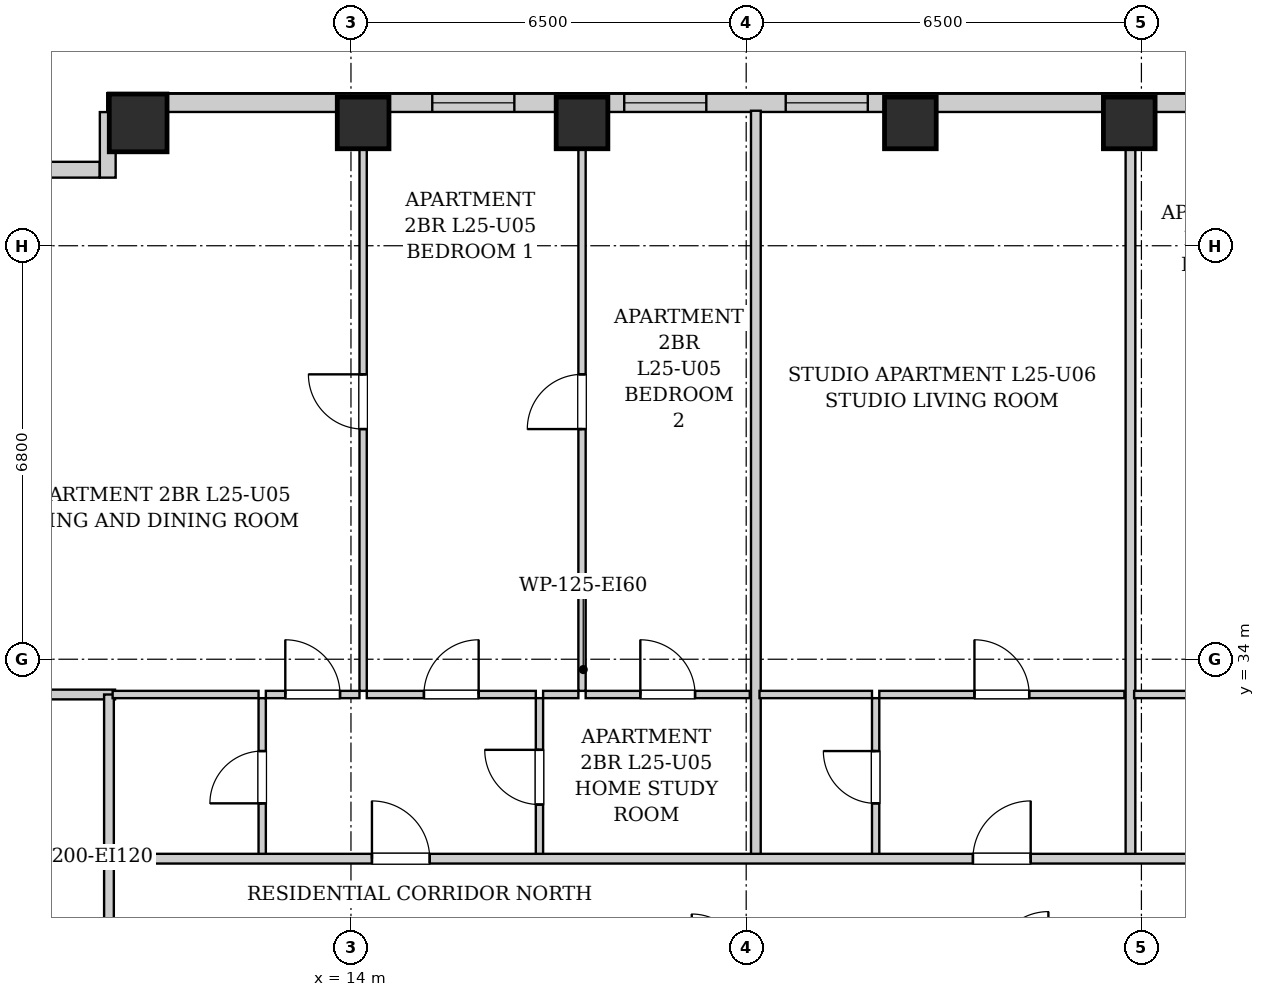
"""IFC4 building model, lengths in metres.
Left out: names, types, materials, properties, quantities, classifications, styles, units other than length and angle.
Written with IfcOpenShell. Run it as: python <this file> out.ifc"""

import sys

from ifc_helpers import new_model, si_unit, direction, frame, frame_2d, origin, origin_2d, place, context, subcontext, project, spatial, rectangle, extrude, element, fill, save


model = new_model("IFC4")
c1 = context("Model", 3, precision=1e-05, world=origin(), true_north=direction((0.0, 1.0)))
c2 = subcontext(c1, "Body", "Model", "MODEL_VIEW")
j1 = project(units=[si_unit("LENGTHUNIT", "METRE"), si_unit("PLANEANGLEUNIT", "RADIAN")], contexts=[c1])
p1 = place(None, origin())
s1 = spatial("IfcSite", under=j1, at=p1, CompositionType="ELEMENT")
p2 = place(p1, origin())
s2 = spatial("IfcBuilding", under=s1, at=p2, CompositionType="ELEMENT")
p3 = place(p2, frame((0.0, 0.0, 91.1)))
s3 = spatial("IfcBuildingStorey", under=s2, at=p3, CompositionType="ELEMENT", Elevation=91.1)
p4 = place(p3, frame((10.5, 42.82, 0.0), z_axis=(0.0, 0.0, 1.0), x_axis=(1.0, 0.0, 0.0)))
e1 = element("IfcColumn", 1, at=p4, inside=s3, PredefinedType="COLUMN", context=c2, shape_type="SweptSolid", body=[
    extrude(rectangle(XDim=0.95, YDim=0.95, at=origin_2d()), origin(), (0.0, 0.0, 1.0), 3.2),
])
for number, where, z_axis, x_axis in (
    (2, (14.2, 42.82, 0.0), (0.0, 0.0, 1.0), (1.0, 0.0, 0.0)),
    (3, (17.8, 42.82, 0.0), (0.0, 0.0, 1.0), (1.0, 0.0, 0.0)),
    (4, (23.2, 42.82, 0.0), (0.0, 0.0, 1.0), (1.0, 0.0, 0.0)),
    (5, (26.8, 42.82, 0.0), (0.0, 0.0, 1.0), (1.0, 0.0, 0.0)),
):
    element("IfcColumn", number, at=place(p3, frame(where, z_axis=z_axis, x_axis=x_axis)), inside=s3, PredefinedType="COLUMN", context=c2, shape_type="SweptSolid", body=[
        extrude(rectangle(XDim=0.85, YDim=0.85, at=origin_2d()), origin(), (0.0, 0.0, 1.0), 3.2),
    ])
p5 = place(p3, frame((10.0, 43.15, 0.0), z_axis=(0.0, 0.0, 1.0), x_axis=(1.0, 0.0, 0.0)))
e6 = element("IfcWall", 6, at=p5, inside=s3, PredefinedType="SOLIDWALL", context=c2, shape_type="SweptSolid", body=[
    extrude(rectangle(XDim=23.9, YDim=0.3, at=frame_2d((11.95, 0.0))), origin(), (0.0, 0.0, 1.0), 2.94),
])
p6 = place(p5, frame((5.337, 0.0, 0.55)))
e7 = element("IfcOpeningElement", 7, at=p6, cuts=e6, PredefinedType="OPENING", context=c2, shape_type="SweptSolid", body=[
    extrude(rectangle(XDim=1.35, YDim=1.2, at=frame_2d((0.675, 0.6))), frame((0.0, 0.16, 0.0), z_axis=(0.0, -1.0, 0.0), x_axis=(1.0, 0.0, 0.0)), (0.0, 0.0, 1.0), 0.32),
])
p7 = place(p5, frame((8.494, 0.0, 0.55)))
e8 = element("IfcOpeningElement", 8, at=p7, cuts=e6, PredefinedType="OPENING", context=c2, shape_type="SweptSolid", body=[
    extrude(rectangle(XDim=1.35, YDim=1.2, at=frame_2d((0.675, 0.6))), frame((0.0, 0.16, 0.0), z_axis=(0.0, -1.0, 0.0), x_axis=(1.0, 0.0, 0.0)), (0.0, 0.0, 1.0), 0.32),
])
p8 = place(p5, frame((11.15, 0.0, 0.55)))
e9 = element("IfcOpeningElement", 9, at=p8, cuts=e6, PredefinedType="OPENING", context=c2, shape_type="SweptSolid", body=[
    extrude(rectangle(XDim=1.35, YDim=1.2, at=frame_2d((0.675, 0.6))), frame((0.0, 0.16, 0.0), z_axis=(0.0, -1.0, 0.0), x_axis=(1.0, 0.0, 0.0)), (0.0, 0.0, 1.0), 0.32),
])
p9 = place(p5, frame((17.738, 0.0, 0.55)))
e10 = element("IfcOpeningElement", 10, at=p9, cuts=e6, PredefinedType="OPENING", context=c2, shape_type="SweptSolid", body=[
    extrude(rectangle(XDim=1.35, YDim=1.2, at=frame_2d((0.675, 0.6))), frame((0.0, 0.16, 0.0), z_axis=(0.0, -1.0, 0.0), x_axis=(1.0, 0.0, 0.0)), (0.0, 0.0, 1.0), 0.32),
])
p10 = place(p5, frame((20.97, 0.0, 0.55)))
e11 = element("IfcOpeningElement", 11, at=p10, cuts=e6, PredefinedType="OPENING", context=c2, shape_type="SweptSolid", body=[
    extrude(rectangle(XDim=1.35, YDim=1.2, at=frame_2d((0.675, 0.6))), frame((0.0, 0.16, 0.0), z_axis=(0.0, -1.0, 0.0), x_axis=(1.0, 0.0, 0.0)), (0.0, 0.0, 1.0), 0.32),
])
p11 = place(p3, frame((8.882, 42.05, 0.0), z_axis=(0.0, 0.0, 1.0), x_axis=(1.0, 0.0, 0.0)))
e12 = element("IfcWall", 12, at=p11, inside=s3, PredefinedType="SOLIDWALL", context=c2, shape_type="SweptSolid", body=[
    extrude(rectangle(XDim=0.986, YDim=0.26, at=frame_2d((0.493, 0.0))), origin(), (0.0, 0.0, 1.0), 2.94),
])
p12 = place(p3, frame((10.0, 41.92, 0.0), z_axis=(0.0, 0.0, 1.0), x_axis=(0.0, 1.0, 0.0)))
e13 = element("IfcWall", 13, at=p12, inside=s3, PredefinedType="SOLIDWALL", context=c2, shape_type="SweptSolid", body=[
    extrude(rectangle(XDim=1.078, YDim=0.26, at=frame_2d((0.539, 0.0))), origin(), (0.0, 0.0, 1.0), 2.94),
])
p13 = place(p3, frame((10.02, 28.98, 0.0), z_axis=(0.0, 0.0, 1.0), x_axis=(0.0, 1.0, 0.0)))
e14 = element("IfcWall", 14, at=p13, inside=s3, PredefinedType="PARTITIONING", context=c2, shape_type="SweptSolid", body=[
    extrude(rectangle(XDim=1.74, YDim=0.16, at=frame_2d((0.87, 0.0))), origin(), (0.0, 0.0, 1.0), 2.94),
])
p14 = place(p3, frame((7.78, 33.42, 0.0), z_axis=(0.0, 0.0, 1.0), x_axis=(1.0, 0.0, 0.0)))
e15 = element("IfcWall", 15, at=p14, inside=s3, PredefinedType="PARTITIONING", context=c2, shape_type="SweptSolid", body=[
    extrude(rectangle(XDim=2.34, YDim=0.16, at=frame_2d((1.17, 0.0))), origin(), (0.0, 0.0, 1.0), 2.94),
])
p15 = place(p3, frame((10.02, 30.76, 0.0), z_axis=(0.0, 0.0, 1.0), x_axis=(0.0, 1.0, 0.0)))
e16 = element("IfcWall", 16, at=p15, inside=s3, PredefinedType="PARTITIONING", context=c2, shape_type="SweptSolid", body=[
    extrude(rectangle(XDim=2.66, YDim=0.16, at=frame_2d((1.33, 0.0))), origin(), (0.0, 0.0, 1.0), 2.94),
])
p16 = place(p3, frame((12.54, 30.76, 0.0), z_axis=(0.0, 0.0, 1.0), x_axis=(0.0, 1.0, 0.0)))
e17 = element("IfcWall", 17, at=p16, inside=s3, PredefinedType="PARTITIONING", context=c2, shape_type="SweptSolid", body=[
    extrude(rectangle(XDim=2.6, YDim=0.12, at=frame_2d((1.3, 0.0))), origin(), (0.0, 0.0, 1.0), 2.94),
])
p17 = place(p16, frame((0.87, 0.0, 0.0)))
e18 = element("IfcOpeningElement", 18, at=p17, cuts=e17, PredefinedType="OPENING", context=c2, shape_type="SweptSolid", body=[
    extrude(rectangle(XDim=0.86, YDim=2.05, at=frame_2d((0.43, 1.025))), frame((0.0, 0.07, 0.0), z_axis=(0.0, -1.0, 0.0), x_axis=(1.0, 0.0, 0.0)), (0.0, 0.0, 1.0), 0.14),
])
p18 = place(p3, frame((10.08, 33.42, 0.0), z_axis=(0.0, 0.0, 1.0), x_axis=(1.0, 0.0, 0.0)))
e19 = element("IfcWall", 19, at=p18, inside=s3, PredefinedType="PARTITIONING", context=c2, shape_type="SweptSolid", body=[
    extrude(rectangle(XDim=2.4, YDim=0.12, at=frame_2d((1.2, 0.0))), origin(), (0.0, 0.0, 1.0), 2.94),
])
p19 = place(p3, frame((17.1, 30.76, 0.0), z_axis=(0.0, 0.0, 1.0), x_axis=(0.0, 1.0, 0.0)))
e20 = element("IfcWall", 20, at=p19, inside=s3, PredefinedType="PARTITIONING", context=c2, shape_type="SweptSolid", body=[
    extrude(rectangle(XDim=2.6, YDim=0.12, at=frame_2d((1.3, 0.0))), origin(), (0.0, 0.0, 1.0), 2.94),
])
p20 = place(p19, frame((0.85, 0.0, 0.0)))
e21 = element("IfcOpeningElement", 21, at=p20, cuts=e20, PredefinedType="OPENING", context=c2, shape_type="SweptSolid", body=[
    extrude(rectangle(XDim=0.9, YDim=2.05, at=frame_2d((0.45, 1.025))), frame((0.0, 0.07, 0.0), z_axis=(0.0, -1.0, 0.0), x_axis=(1.0, 0.0, 0.0)), (0.0, 0.0, 1.0), 0.14),
])
p21 = place(p3, frame((12.6, 33.42, 0.0), z_axis=(0.0, 0.0, 1.0), x_axis=(1.0, 0.0, 0.0)))
e22 = element("IfcWall", 22, at=p21, inside=s3, PredefinedType="PARTITIONING", context=c2, shape_type="SweptSolid", body=[
    extrude(rectangle(XDim=1.54, YDim=0.12, at=frame_2d((0.77, 0.0))), origin(), (0.0, 0.0, 1.0), 2.94),
])
p22 = place(p21, frame((0.32, 0.0, 0.0)))
e23 = element("IfcOpeningElement", 23, at=p22, cuts=e22, PredefinedType="OPENING", context=c2, shape_type="SweptSolid", body=[
    extrude(rectangle(XDim=0.9, YDim=2.05, at=frame_2d((0.45, 1.025))), frame((0.0, 0.07, 0.0), z_axis=(0.0, -1.0, 0.0), x_axis=(1.0, 0.0, 0.0)), (0.0, 0.0, 1.0), 0.14),
])
p23 = place(p3, frame((14.26, 33.42, 0.0), z_axis=(0.0, 0.0, 1.0), x_axis=(1.0, 0.0, 0.0)))
e24 = element("IfcWall", 24, at=p23, inside=s3, PredefinedType="PARTITIONING", context=c2, shape_type="SweptSolid", body=[
    extrude(rectangle(XDim=2.78, YDim=0.12, at=frame_2d((1.39, 0.0))), origin(), (0.0, 0.0, 1.0), 2.94),
])
p24 = place(p23, frame((0.94, 0.0, 0.0)))
e25 = element("IfcOpeningElement", 25, at=p24, cuts=e24, PredefinedType="OPENING", context=c2, shape_type="SweptSolid", body=[
    extrude(rectangle(XDim=0.9, YDim=2.05, at=frame_2d((0.45, 1.025))), frame((0.0, 0.07, 0.0), z_axis=(0.0, -1.0, 0.0), x_axis=(1.0, 0.0, 0.0)), (0.0, 0.0, 1.0), 0.14),
])
p25 = place(p3, frame((17.16, 33.42, 0.0), z_axis=(0.0, 0.0, 1.0), x_axis=(1.0, 0.0, 0.0)))
e26 = element("IfcWall", 26, at=p25, inside=s3, PredefinedType="PARTITIONING", context=c2, shape_type="SweptSolid", body=[
    extrude(rectangle(XDim=0.58, YDim=0.12, at=frame_2d((0.29, 0.0))), origin(), (0.0, 0.0, 1.0), 2.94),
])
p26 = place(p3, frame((17.86, 33.42, 0.0), z_axis=(0.0, 0.0, 1.0), x_axis=(1.0, 0.0, 0.0)))
e27 = element("IfcWall", 27, at=p26, inside=s3, PredefinedType="PARTITIONING", context=c2, shape_type="SweptSolid", body=[
    extrude(rectangle(XDim=2.699, YDim=0.12, at=frame_2d((1.35, 0.0))), origin(), (0.0, 0.0, 1.0), 2.94),
])
p27 = place(p26, frame((0.899, 0.0, 0.0)))
e28 = element("IfcOpeningElement", 28, at=p27, cuts=e27, PredefinedType="OPENING", context=c2, shape_type="SweptSolid", body=[
    extrude(rectangle(XDim=0.9, YDim=2.05, at=frame_2d((0.45, 1.025))), frame((0.0, 0.07, 0.0), z_axis=(0.0, -1.0, 0.0), x_axis=(1.0, 0.0, 0.0)), (0.0, 0.0, 1.0), 0.14),
])
p28 = place(p3, frame((14.2, 33.48, 0.0), z_axis=(0.0, 0.0, 1.0), x_axis=(0.0, 1.0, 0.0)))
e29 = element("IfcWall", 29, at=p28, inside=s3, PredefinedType="PARTITIONING", context=c2, shape_type="SweptSolid", body=[
    extrude(rectangle(XDim=9.54, YDim=0.12, at=frame_2d((4.77, 0.0))), origin(), (0.0, 0.0, 1.0), 2.94),
])
p29 = place(p28, frame((4.305, 0.0, 0.0)))
e30 = element("IfcOpeningElement", 30, at=p29, cuts=e29, PredefinedType="OPENING", context=c2, shape_type="SweptSolid", body=[
    extrude(rectangle(XDim=0.9, YDim=2.05, at=frame_2d((0.45, 1.025))), frame((0.0, 0.07, 0.0), z_axis=(0.0, -1.0, 0.0), x_axis=(1.0, 0.0, 0.0)), (0.0, 0.0, 1.0), 0.14),
])
p30 = place(p3, frame((17.8, 33.48, 0.0), z_axis=(0.0, 0.0, 1.0), x_axis=(0.0, 1.0, 0.0)))
e31 = element("IfcWall", 31, at=p30, inside=s3, PredefinedType="PARTITIONING", context=c2, shape_type="SweptSolid", body=[
    extrude(rectangle(XDim=9.54, YDim=0.12, at=frame_2d((4.77, 0.0))), origin(), (0.0, 0.0, 1.0), 2.309),
])
p31 = place(p30, frame((4.305, 0.0, 0.0)))
e32 = element("IfcOpeningElement", 32, at=p31, cuts=e31, PredefinedType="OPENING", context=c2, shape_type="SweptSolid", body=[
    extrude(rectangle(XDim=0.9, YDim=2.05, at=frame_2d((0.45, 1.025))), frame((0.0, 0.07, 0.0), z_axis=(0.0, -1.0, 0.0), x_axis=(1.0, 0.0, 0.0)), (0.0, 0.0, 1.0), 0.14),
])
p32 = place(p3, frame((20.659, 30.76, 0.0), z_axis=(0.0, 0.0, 1.0), x_axis=(0.0, 1.0, 0.0)))
e33 = element("IfcWall", 33, at=p32, inside=s3, PredefinedType="PARTITIONING", context=c2, shape_type="SweptSolid", body=[
    extrude(rectangle(XDim=12.26, YDim=0.16, at=frame_2d((6.13, 0.0))), origin(), (0.0, 0.0, 1.0), 2.94),
])
p33 = place(p3, frame((22.629, 30.76, 0.0), z_axis=(0.0, 0.0, 1.0), x_axis=(0.0, 1.0, 0.0)))
e34 = element("IfcWall", 34, at=p33, inside=s3, PredefinedType="PARTITIONING", context=c2, shape_type="SweptSolid", body=[
    extrude(rectangle(XDim=2.6, YDim=0.12, at=frame_2d((1.3, 0.0))), origin(), (0.0, 0.0, 1.0), 2.94),
])
p34 = place(p33, frame((0.87, 0.0, 0.0)))
e35 = element("IfcOpeningElement", 35, at=p34, cuts=e34, PredefinedType="OPENING", context=c2, shape_type="SweptSolid", body=[
    extrude(rectangle(XDim=0.86, YDim=2.05, at=frame_2d((0.43, 1.025))), frame((0.0, 0.07, 0.0), z_axis=(0.0, -1.0, 0.0), x_axis=(1.0, 0.0, 0.0)), (0.0, 0.0, 1.0), 0.14),
])
p35 = place(p3, frame((20.719, 33.42, 0.0), z_axis=(0.0, 0.0, 1.0), x_axis=(1.0, 0.0, 0.0)))
e36 = element("IfcWall", 36, at=p35, inside=s3, PredefinedType="PARTITIONING", context=c2, shape_type="SweptSolid", body=[
    extrude(rectangle(XDim=1.85, YDim=0.12, at=frame_2d((0.925, 0.0))), origin(), (0.0, 0.0, 1.0), 2.94),
])
p36 = place(p3, frame((22.689, 33.42, 0.0), z_axis=(0.0, 0.0, 1.0), x_axis=(1.0, 0.0, 0.0)))
e37 = element("IfcWall", 37, at=p36, inside=s3, PredefinedType="PARTITIONING", context=c2, shape_type="SweptSolid", body=[
    extrude(rectangle(XDim=4.031, YDim=0.12, at=frame_2d((2.016, 0.0))), origin(), (0.0, 0.0, 1.0), 2.94),
])
p37 = place(p36, frame((1.565, 0.0, 0.0)))
e38 = element("IfcOpeningElement", 38, at=p37, cuts=e37, PredefinedType="OPENING", context=c2, shape_type="SweptSolid", body=[
    extrude(rectangle(XDim=0.9, YDim=2.05, at=frame_2d((0.45, 1.025))), frame((0.0, 0.07, 0.0), z_axis=(0.0, -1.0, 0.0), x_axis=(1.0, 0.0, 0.0)), (0.0, 0.0, 1.0), 0.14),
])
p38 = place(p3, frame((26.82, 30.76, 0.0), z_axis=(0.0, 0.0, 1.0), x_axis=(0.0, 1.0, 0.0)))
e39 = element("IfcWall", 39, at=p38, inside=s3, PredefinedType="PARTITIONING", context=c2, shape_type="SweptSolid", body=[
    extrude(rectangle(XDim=12.26, YDim=0.16, at=frame_2d((6.13, 0.0))), origin(), (0.0, 0.0, 1.0), 2.94),
])
p39 = place(p3, frame((26.88, 33.42, 0.0), z_axis=(0.0, 0.0, 1.0), x_axis=(1.0, 0.0, 0.0)))
e40 = element("IfcWall", 40, at=p39, inside=s3, PredefinedType="PARTITIONING", context=c2, shape_type="SweptSolid", body=[
    extrude(rectangle(XDim=2.4, YDim=0.12, at=frame_2d((1.2, 0.0))), origin(), (0.0, 0.0, 1.0), 2.94),
])
p40 = place(p3, frame((10.05, 30.72, 0.0), z_axis=(0.0, 0.0, 1.0), x_axis=(1.0, 0.0, 0.0)))
e41 = element("IfcWall", 41, at=p40, inside=s3, PredefinedType="PARTITIONING", context=c2, shape_type="SweptSolid", body=[
    extrude(rectangle(XDim=30.8, YDim=0.16, at=frame_2d((15.4, 0.0))), origin(), (0.0, 0.0, 1.0), 2.94),
])
p41 = place(p40, frame((4.295, 0.0, 0.0)))
e42 = element("IfcOpeningElement", 42, at=p41, cuts=e41, PredefinedType="OPENING", context=c2, shape_type="SweptSolid", body=[
    extrude(rectangle(XDim=0.95, YDim=2.1, at=frame_2d((0.475, 1.05))), frame((0.0, 0.09, 0.0), z_axis=(0.0, -1.0, 0.0), x_axis=(1.0, 0.0, 0.0)), (0.0, 0.0, 1.0), 0.18),
])
p42 = place(p40, frame((14.179, 0.0, 0.0)))
e43 = element("IfcOpeningElement", 43, at=p42, cuts=e41, PredefinedType="OPENING", context=c2, shape_type="SweptSolid", body=[
    extrude(rectangle(XDim=0.95, YDim=2.1, at=frame_2d((0.475, 1.05))), frame((0.0, 0.09, 0.0), z_axis=(0.0, -1.0, 0.0), x_axis=(1.0, 0.0, 0.0)), (0.0, 0.0, 1.0), 0.18),
])
p43 = place(p40, frame((20.965, 0.0, 0.0)))
e44 = element("IfcOpeningElement", 44, at=p43, cuts=e41, PredefinedType="OPENING", context=c2, shape_type="SweptSolid", body=[
    extrude(rectangle(XDim=0.95, YDim=2.1, at=frame_2d((0.475, 1.05))), frame((0.0, 0.09, 0.0), z_axis=(0.0, -1.0, 0.0), x_axis=(1.0, 0.0, 0.0)), (0.0, 0.0, 1.0), 0.18),
])
p44 = place(p17, origin())
e45 = element("IfcDoor", 45, at=p44, inside=s3, OperationType="SINGLE_SWING_LEFT", PredefinedType="DOOR", context=c2, shape_type="SweptSolid", body=[
    extrude(rectangle(XDim=0.86, YDim=2.05, at=frame_2d((0.43, 1.025))), frame((0.0, 0.025, 0.0), z_axis=(0.0, -1.0, 0.0), x_axis=(1.0, 0.0, 0.0)), (0.0, 0.0, 1.0), 0.05),
])
fill(e18, e45)
p45 = place(p20, origin())
e46 = element("IfcDoor", 46, at=p45, inside=s3, OperationType="SINGLE_SWING_RIGHT", PredefinedType="DOOR", context=c2, shape_type="SweptSolid", body=[
    extrude(rectangle(XDim=0.9, YDim=2.05, at=frame_2d((0.45, 1.025))), frame((0.0, 0.025, 0.0), z_axis=(0.0, -1.0, 0.0), x_axis=(1.0, 0.0, 0.0)), (0.0, 0.0, 1.0), 0.05),
])
fill(e21, e46)
p46 = place(p22, origin())
e47 = element("IfcDoor", 47, at=p46, inside=s3, OperationType="SINGLE_SWING_LEFT", PredefinedType="DOOR", context=c2, shape_type="SweptSolid", body=[
    extrude(rectangle(XDim=0.9, YDim=2.05, at=frame_2d((0.45, 1.025))), frame((0.0, 0.025, 0.0), z_axis=(0.0, -1.0, 0.0), x_axis=(1.0, 0.0, 0.0)), (0.0, 0.0, 1.0), 0.05),
])
fill(e23, e47)
p47 = place(p24, origin())
e48 = element("IfcDoor", 48, at=p47, inside=s3, OperationType="SINGLE_SWING_RIGHT", PredefinedType="DOOR", context=c2, shape_type="SweptSolid", body=[
    extrude(rectangle(XDim=0.9, YDim=2.05, at=frame_2d((0.45, 1.025))), frame((0.0, 0.025, 0.0), z_axis=(0.0, -1.0, 0.0), x_axis=(1.0, 0.0, 0.0)), (0.0, 0.0, 1.0), 0.05),
])
fill(e25, e48)
p48 = place(p27, origin())
e49 = element("IfcDoor", 49, at=p48, inside=s3, OperationType="SINGLE_SWING_LEFT", PredefinedType="DOOR", context=c2, shape_type="SweptSolid", body=[
    extrude(rectangle(XDim=0.9, YDim=2.05, at=frame_2d((0.45, 1.025))), frame((0.0, 0.025, 0.0), z_axis=(0.0, -1.0, 0.0), x_axis=(1.0, 0.0, 0.0)), (0.0, 0.0, 1.0), 0.05),
])
fill(e28, e49)
p49 = place(p29, origin())
e50 = element("IfcDoor", 50, at=p49, inside=s3, OperationType="SINGLE_SWING_RIGHT", PredefinedType="DOOR", context=c2, shape_type="SweptSolid", body=[
    extrude(rectangle(XDim=0.9, YDim=2.05, at=frame_2d((0.45, 1.025))), frame((0.0, 0.025, 0.0), z_axis=(0.0, -1.0, 0.0), x_axis=(1.0, 0.0, 0.0)), (0.0, 0.0, 1.0), 0.05),
])
fill(e30, e50)
p50 = place(p31, origin())
e51 = element("IfcDoor", 51, at=p50, inside=s3, OperationType="SINGLE_SWING_LEFT", PredefinedType="DOOR", context=c2, shape_type="SweptSolid", body=[
    extrude(rectangle(XDim=0.9, YDim=2.05, at=frame_2d((0.45, 1.025))), frame((0.0, 0.025, 0.0), z_axis=(0.0, -1.0, 0.0), x_axis=(1.0, 0.0, 0.0)), (0.0, 0.0, 1.0), 0.05),
])
fill(e32, e51)
p51 = place(p34, origin())
e52 = element("IfcDoor", 52, at=p51, inside=s3, OperationType="SINGLE_SWING_RIGHT", PredefinedType="DOOR", context=c2, shape_type="SweptSolid", body=[
    extrude(rectangle(XDim=0.86, YDim=2.05, at=frame_2d((0.43, 1.025))), frame((0.0, 0.025, 0.0), z_axis=(0.0, -1.0, 0.0), x_axis=(1.0, 0.0, 0.0)), (0.0, 0.0, 1.0), 0.05),
])
fill(e35, e52)
p52 = place(p37, origin())
e53 = element("IfcDoor", 53, at=p52, inside=s3, OperationType="SINGLE_SWING_LEFT", PredefinedType="DOOR", context=c2, shape_type="SweptSolid", body=[
    extrude(rectangle(XDim=0.9, YDim=2.05, at=frame_2d((0.45, 1.025))), frame((0.0, 0.025, 0.0), z_axis=(0.0, -1.0, 0.0), x_axis=(1.0, 0.0, 0.0)), (0.0, 0.0, 1.0), 0.05),
])
fill(e38, e53)
p53 = place(p41, origin())
e54 = element("IfcDoor", 54, at=p53, inside=s3, OperationType="SINGLE_SWING_LEFT", PredefinedType="DOOR", context=c2, shape_type="SweptSolid", body=[
    extrude(rectangle(XDim=0.95, YDim=2.1, at=frame_2d((0.475, 1.05))), frame((0.0, 0.025, 0.0), z_axis=(0.0, -1.0, 0.0), x_axis=(1.0, 0.0, 0.0)), (0.0, 0.0, 1.0), 0.05),
])
fill(e42, e54)
p54 = place(p42, origin())
e55 = element("IfcDoor", 55, at=p54, inside=s3, OperationType="SINGLE_SWING_RIGHT", PredefinedType="DOOR", context=c2, shape_type="SweptSolid", body=[
    extrude(rectangle(XDim=0.95, YDim=2.1, at=frame_2d((0.475, 1.05))), frame((0.0, 0.025, 0.0), z_axis=(0.0, -1.0, 0.0), x_axis=(1.0, 0.0, 0.0)), (0.0, 0.0, 1.0), 0.05),
])
fill(e43, e55)
p55 = place(p6, origin())
e56 = element("IfcWindow", 56, at=p55, inside=s3, PartitioningType="SINGLE_PANEL", PredefinedType="WINDOW", context=c2, shape_type="SweptSolid", body=[
    extrude(rectangle(XDim=1.35, YDim=1.2, at=frame_2d((0.675, 0.6))), frame((0.0, 0.03, 0.0), z_axis=(0.0, -1.0, 0.0), x_axis=(1.0, 0.0, 0.0)), (0.0, 0.0, 1.0), 0.06),
])
fill(e7, e56)
p56 = place(p7, origin())
e57 = element("IfcWindow", 57, at=p56, inside=s3, PartitioningType="SINGLE_PANEL", PredefinedType="WINDOW", context=c2, shape_type="SweptSolid", body=[
    extrude(rectangle(XDim=1.35, YDim=1.2, at=frame_2d((0.675, 0.6))), frame((0.0, 0.03, 0.0), z_axis=(0.0, -1.0, 0.0), x_axis=(1.0, 0.0, 0.0)), (0.0, 0.0, 1.0), 0.06),
])
fill(e8, e57)
p57 = place(p8, origin())
e58 = element("IfcWindow", 58, at=p57, inside=s3, PartitioningType="SINGLE_PANEL", PredefinedType="WINDOW", context=c2, shape_type="SweptSolid", body=[
    extrude(rectangle(XDim=1.35, YDim=1.2, at=frame_2d((0.675, 0.6))), frame((0.0, 0.03, 0.0), z_axis=(0.0, -1.0, 0.0), x_axis=(1.0, 0.0, 0.0)), (0.0, 0.0, 1.0), 0.06),
])
fill(e9, e58)
save(model, sys.argv[1])
